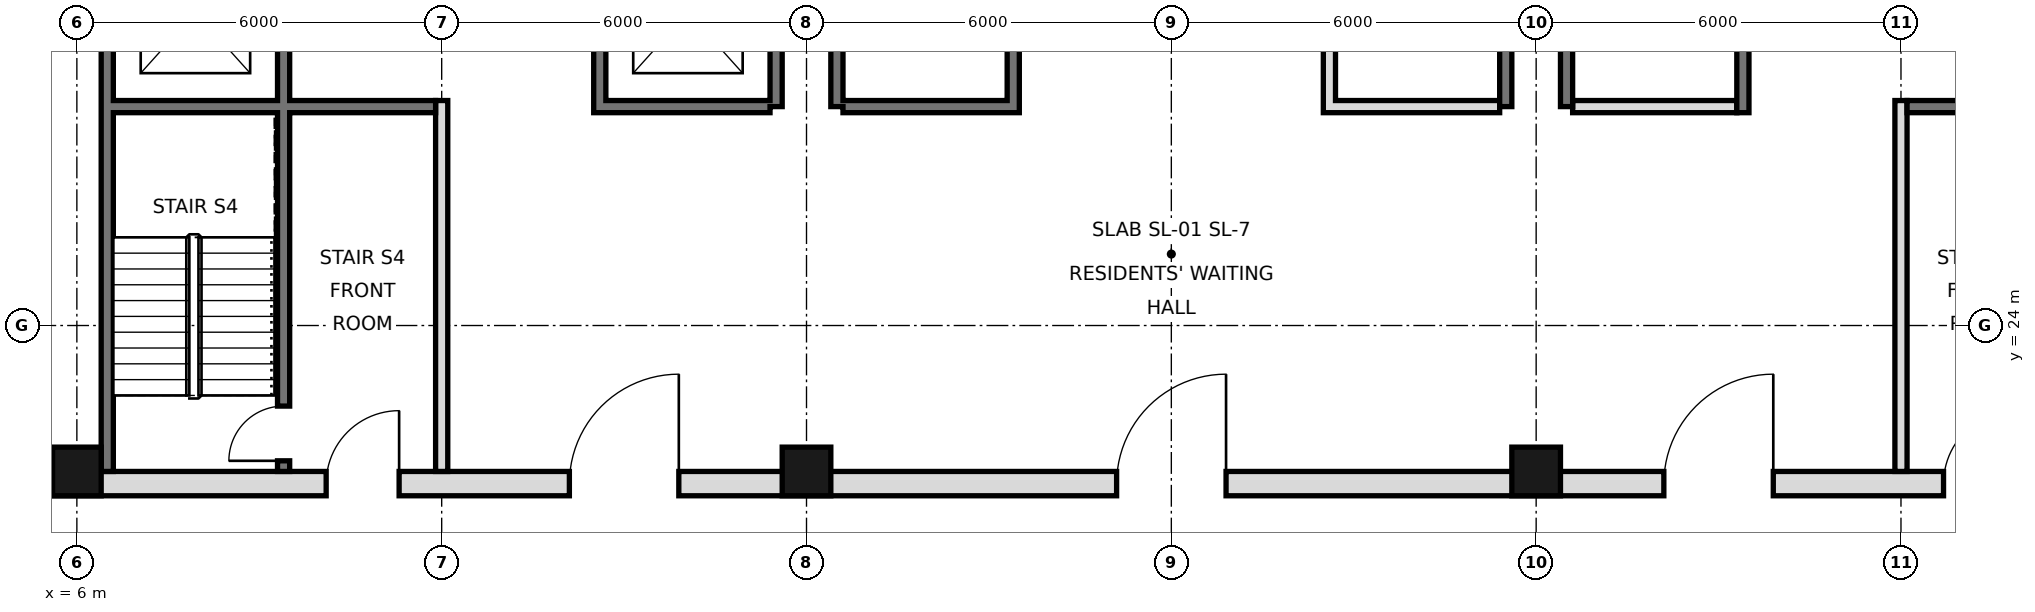
"""IFC4 building model, lengths in metres.
Left out: names, types, materials, properties, quantities, classifications, styles, units other than length and angle.
Written with IfcOpenShell. Run it as: python <this file> out.ifc"""

import sys

from ifc_helpers import new_model, si_unit, direction, frame, frame_2d, origin, origin_2d, place, context, subcontext, project, spatial, rectangle, hollow_rectangle, extrude, element, fill, save


model = new_model("IFC4")
c1 = context("Model", 3, precision=1e-05, world=origin(), true_north=direction((0.0, 1.0)))
c2 = subcontext(c1, "Body", "Model", "MODEL_VIEW")
j1 = project(units=[si_unit("LENGTHUNIT", "METRE"), si_unit("PLANEANGLEUNIT", "RADIAN")], contexts=[c1])
p1 = place(None, origin())
s1 = spatial("IfcSite", under=j1, at=p1, CompositionType="ELEMENT")
p2 = place(p1, origin())
s2 = spatial("IfcBuilding", under=s1, at=p2, CompositionType="ELEMENT")
p3 = place(p2, frame((0.0, 0.0, 147.4)))
s3 = spatial("IfcBuildingStorey", under=s2, at=p3, CompositionType="ELEMENT", Elevation=147.4)
for number, where, z_axis, x_axis in (
    (1, (6.0, 21.6, 0.0), (0.0, 0.0, 1.0), (1.0, 0.0, 0.0)),
    (2, (18.0, 21.6, 0.0), (0.0, 0.0, 1.0), (1.0, 0.0, 0.0)),
    (3, (30.0, 21.6, 0.0), (0.0, 0.0, 1.0), (1.0, 0.0, 0.0)),
):
    element("IfcColumn", number, at=place(p3, frame(where, z_axis=z_axis, x_axis=x_axis)), inside=s3, PredefinedType="COLUMN", context=c2, shape_type="SweptSolid", body=[
        extrude(hollow_rectangle(XDim=0.8, YDim=0.8, WallThickness=0.045, at=origin_2d()), origin(), (0.0, 0.0, 1.0), 3.6),
    ])
p4 = place(p3, frame((6.5, 21.6, 0.0), z_axis=(0.0, 0.0, 1.0), x_axis=(0.0, 1.0, 0.0)))
e4 = element("IfcWall", 4, at=p4, inside=s3, PredefinedType="SOLIDWALL", context=c2, shape_type="SweptSolid", body=[
    extrude(rectangle(XDim=23.5, YDim=0.2, at=frame_2d((11.75, 0.0))), origin(), (0.0, 0.0, 1.0), 3.42),
])
for number, where, z_axis, x_axis in (
    (5, (17.5, 27.6, 0.0), (0.0, 0.0, 1.0), (0.0, 1.0, 0.0)),
    (6, (18.5, 27.6, 0.0), (0.0, 0.0, 1.0), (0.0, 1.0, 0.0)),
    (7, (29.5, 27.6, 0.0), (0.0, 0.0, 1.0), (0.0, 1.0, 0.0)),
    (8, (30.5, 27.6, 0.0), (0.0, 0.0, 1.0), (0.0, 1.0, 0.0)),
):
    element("IfcWall", number, at=place(p3, frame(where, z_axis=z_axis, x_axis=x_axis)), inside=s3, PredefinedType="SOLIDWALL", context=c2, shape_type="SweptSolid", body=[
        extrude(rectangle(XDim=17.5, YDim=0.2, at=frame_2d((8.75, 0.0))), origin(), (0.0, 0.0, 1.0), 3.42),
    ])
p5 = place(p3, frame((5.6, 21.4, 0.0), z_axis=(0.0, 0.0, 1.0), x_axis=(1.0, 0.0, 0.0)))
e9 = element("IfcWall", 9, at=p5, inside=s3, PredefinedType="SOLIDWALL", context=c2, shape_type="SweptSolid", body=[
    extrude(rectangle(XDim=36.8, YDim=0.4, at=frame_2d((18.4, 0.0))), origin(), (0.0, 0.0, 1.0), 3.42),
])
p6 = place(p5, frame((8.5, 0.0, 0.0)))
e10 = element("IfcOpeningElement", 10, at=p6, cuts=e9, PredefinedType="OPENING", context=c2, shape_type="SweptSolid", body=[
    extrude(rectangle(XDim=1.8, YDim=2.1, at=frame_2d((0.9, 1.05))), frame((0.0, 0.21, 0.0), z_axis=(0.0, -1.0, 0.0), x_axis=(1.0, 0.0, 0.0)), (0.0, 0.0, 1.0), 0.42),
])
p7 = place(p5, frame((17.5, 0.0, 0.0)))
e11 = element("IfcOpeningElement", 11, at=p7, cuts=e9, PredefinedType="OPENING", context=c2, shape_type="SweptSolid", body=[
    extrude(rectangle(XDim=1.8, YDim=2.1, at=frame_2d((0.9, 1.05))), frame((0.0, 0.21, 0.0), z_axis=(0.0, -1.0, 0.0), x_axis=(1.0, 0.0, 0.0)), (0.0, 0.0, 1.0), 0.42),
])
p8 = place(p5, frame((26.5, 0.0, 0.0)))
e12 = element("IfcOpeningElement", 12, at=p8, cuts=e9, PredefinedType="OPENING", context=c2, shape_type="SweptSolid", body=[
    extrude(rectangle(XDim=1.8, YDim=2.1, at=frame_2d((0.9, 1.05))), frame((0.0, 0.21, 0.0), z_axis=(0.0, -1.0, 0.0), x_axis=(1.0, 0.0, 0.0)), (0.0, 0.0, 1.0), 0.42),
])
p9 = place(p5, frame((4.5, 0.0, 0.0)))
e13 = element("IfcOpeningElement", 13, at=p9, cuts=e9, PredefinedType="OPENING", context=c2, shape_type="SweptSolid", body=[
    extrude(rectangle(XDim=1.2, YDim=2.1, at=frame_2d((0.6, 1.05))), frame((0.0, 0.21, 0.0), z_axis=(0.0, -1.0, 0.0), x_axis=(1.0, 0.0, 0.0)), (0.0, 0.0, 1.0), 0.42),
])
p10 = place(p5, frame((31.1, 0.0, 0.0)))
e14 = element("IfcOpeningElement", 14, at=p10, cuts=e9, PredefinedType="OPENING", context=c2, shape_type="SweptSolid", body=[
    extrude(rectangle(XDim=1.2, YDim=2.1, at=frame_2d((0.6, 1.05))), frame((0.0, 0.21, 0.0), z_axis=(0.0, -1.0, 0.0), x_axis=(1.0, 0.0, 0.0)), (0.0, 0.0, 1.0), 0.42),
])
p11 = place(p3, frame((12.0, 21.6, 0.0), z_axis=(0.0, 0.0, 1.0), x_axis=(0.0, 1.0, 0.0)))
e15 = element("IfcWall", 15, at=p11, inside=s3, PredefinedType="PARTITIONING", context=c2, shape_type="SweptSolid", body=[
    extrude(rectangle(XDim=6.1, YDim=0.2, at=frame_2d((3.05, 0.0))), origin(), (0.0, 0.0, 1.0), 3.42),
])
p12 = place(p3, frame((14.6, 27.5, 0.0), z_axis=(0.0, 0.0, 1.0), x_axis=(0.0, 1.0, 0.0)))
e16 = element("IfcWall", 16, at=p12, inside=s3, PredefinedType="SOLIDWALL", context=c2, shape_type="SweptSolid", body=[
    extrude(rectangle(XDim=17.5, YDim=0.2, at=frame_2d((8.75, 0.0))), origin(), (0.0, 0.0, 1.0), 3.42),
])
p13 = place(p12, frame((1.1, 0.0, 0.0)))
e17 = element("IfcOpeningElement", 17, at=p13, cuts=e16, PredefinedType="OPENING", context=c2, shape_type="SweptSolid", body=[
    extrude(rectangle(XDim=1.1, YDim=2.1, at=frame_2d((0.55, 1.05))), frame((0.0, 0.11, 0.0), z_axis=(0.0, -1.0, 0.0), x_axis=(1.0, 0.0, 0.0)), (0.0, 0.0, 1.0), 0.22),
])
p14 = place(p12, frame((4.2, 0.0, 0.0)))
e18 = element("IfcOpeningElement", 18, at=p14, cuts=e16, PredefinedType="OPENING", context=c2, shape_type="SweptSolid", body=[
    extrude(rectangle(XDim=1.1, YDim=2.1, at=frame_2d((0.55, 1.05))), frame((0.0, 0.11, 0.0), z_axis=(0.0, -1.0, 0.0), x_axis=(1.0, 0.0, 0.0)), (0.0, 0.0, 1.0), 0.22),
])
p15 = place(p12, frame((15.4, 0.0, 0.0)))
e19 = element("IfcOpeningElement", 19, at=p15, cuts=e16, PredefinedType="OPENING", context=c2, shape_type="SweptSolid", body=[
    extrude(rectangle(XDim=1.1, YDim=2.1, at=frame_2d((0.55, 1.05))), frame((0.0, 0.11, 0.0), z_axis=(0.0, -1.0, 0.0), x_axis=(1.0, 0.0, 0.0)), (0.0, 0.0, 1.0), 0.22),
])
p16 = place(p12, frame((9.9, 0.0, 0.0)))
e20 = element("IfcOpeningElement", 20, at=p16, cuts=e16, PredefinedType="OPENING", context=c2, shape_type="SweptSolid", body=[
    extrude(rectangle(XDim=0.9, YDim=2.1, at=frame_2d((0.45, 1.05))), frame((0.0, 0.11, 0.0), z_axis=(0.0, -1.0, 0.0), x_axis=(1.0, 0.0, 0.0)), (0.0, 0.0, 1.0), 0.22),
])
p17 = place(p3, frame((21.4, 27.5, 0.0), z_axis=(0.0, 0.0, 1.0), x_axis=(0.0, 1.0, 0.0)))
e21 = element("IfcWall", 21, at=p17, inside=s3, PredefinedType="SOLIDWALL", context=c2, shape_type="SweptSolid", body=[
    extrude(rectangle(XDim=17.5, YDim=0.2, at=frame_2d((8.75, 0.0))), origin(), (0.0, 0.0, 1.0), 3.42),
])
p18 = place(p17, frame((9.8, 0.0, 0.0)))
e22 = element("IfcOpeningElement", 22, at=p18, cuts=e21, PredefinedType="OPENING", context=c2, shape_type="SweptSolid", body=[
    extrude(rectangle(XDim=1.0, YDim=2.1, at=frame_2d((0.5, 1.05))), frame((0.0, 0.11, 0.0), z_axis=(0.0, -1.0, 0.0), x_axis=(1.0, 0.0, 0.0)), (0.0, 0.0, 1.0), 0.22),
])
p19 = place(p17, frame((7.4, 0.0, 0.0)))
e23 = element("IfcOpeningElement", 23, at=p19, cuts=e21, PredefinedType="OPENING", context=c2, shape_type="SweptSolid", body=[
    extrude(rectangle(XDim=0.9, YDim=2.1, at=frame_2d((0.45, 1.05))), frame((0.0, 0.11, 0.0), z_axis=(0.0, -1.0, 0.0), x_axis=(1.0, 0.0, 0.0)), (0.0, 0.0, 1.0), 0.22),
])
p20 = place(p3, frame((26.6, 27.5, 0.0), z_axis=(0.0, 0.0, 1.0), x_axis=(0.0, 1.0, 0.0)))
e24 = element("IfcWall", 24, at=p20, inside=s3, PredefinedType="SOLIDWALL", context=c2, shape_type="SweptSolid", body=[
    extrude(rectangle(XDim=17.5, YDim=0.2, at=frame_2d((8.75, 0.0))), origin(), (0.0, 0.0, 1.0), 3.42),
])
p21 = place(p20, frame((4.3, 0.0, 0.0)))
e25 = element("IfcOpeningElement", 25, at=p21, cuts=e24, PredefinedType="OPENING", context=c2, shape_type="SweptSolid", body=[
    extrude(rectangle(XDim=0.9, YDim=2.1, at=frame_2d((0.45, 1.05))), frame((0.0, 0.11, 0.0), z_axis=(0.0, -1.0, 0.0), x_axis=(1.0, 0.0, 0.0)), (0.0, 0.0, 1.0), 0.22),
])
p22 = place(p20, frame((10.35, 0.0, 0.0)))
e26 = element("IfcOpeningElement", 26, at=p22, cuts=e24, PredefinedType="OPENING", context=c2, shape_type="SweptSolid", body=[
    extrude(rectangle(XDim=1.0, YDim=2.1, at=frame_2d((0.5, 1.05))), frame((0.0, 0.11, 0.0), z_axis=(0.0, -1.0, 0.0), x_axis=(1.0, 0.0, 0.0)), (0.0, 0.0, 1.0), 0.22),
])
p23 = place(p20, frame((14.575, 0.0, 0.0)))
e27 = element("IfcOpeningElement", 27, at=p23, cuts=e24, PredefinedType="OPENING", context=c2, shape_type="SweptSolid", body=[
    extrude(rectangle(XDim=1.0, YDim=2.1, at=frame_2d((0.5, 1.05))), frame((0.0, 0.11, 0.0), z_axis=(0.0, -1.0, 0.0), x_axis=(1.0, 0.0, 0.0)), (0.0, 0.0, 1.0), 0.22),
])
p24 = place(p3, frame((33.4, 27.5, 0.0), z_axis=(0.0, 0.0, 1.0), x_axis=(0.0, 1.0, 0.0)))
e28 = element("IfcWall", 28, at=p24, inside=s3, PredefinedType="SOLIDWALL", context=c2, shape_type="SweptSolid", body=[
    extrude(rectangle(XDim=17.5, YDim=0.2, at=frame_2d((8.75, 0.0))), origin(), (0.0, 0.0, 1.0), 3.42),
])
p25 = place(p24, frame((15.4, 0.0, 0.0)))
e29 = element("IfcOpeningElement", 29, at=p25, cuts=e28, PredefinedType="OPENING", context=c2, shape_type="SweptSolid", body=[
    extrude(rectangle(XDim=1.1, YDim=2.1, at=frame_2d((0.55, 1.05))), frame((0.0, 0.11, 0.0), z_axis=(0.0, -1.0, 0.0), x_axis=(1.0, 0.0, 0.0)), (0.0, 0.0, 1.0), 0.22),
])
p26 = place(p24, frame((2.7, 0.0, 0.0)))
e30 = element("IfcOpeningElement", 30, at=p26, cuts=e28, PredefinedType="OPENING", context=c2, shape_type="SweptSolid", body=[
    extrude(rectangle(XDim=1.0, YDim=2.1, at=frame_2d((0.5, 1.05))), frame((0.0, 0.11, 0.0), z_axis=(0.0, -1.0, 0.0), x_axis=(1.0, 0.0, 0.0)), (0.0, 0.0, 1.0), 0.22),
])
p27 = place(p24, frame((9.9, 0.0, 0.0)))
e31 = element("IfcOpeningElement", 31, at=p27, cuts=e28, PredefinedType="OPENING", context=c2, shape_type="SweptSolid", body=[
    extrude(rectangle(XDim=0.9, YDim=2.1, at=frame_2d((0.45, 1.05))), frame((0.0, 0.11, 0.0), z_axis=(0.0, -1.0, 0.0), x_axis=(1.0, 0.0, 0.0)), (0.0, 0.0, 1.0), 0.22),
])
p28 = place(p3, frame((36.0, 21.6, 0.0), z_axis=(0.0, 0.0, 1.0), x_axis=(0.0, 1.0, 0.0)))
e32 = element("IfcWall", 32, at=p28, inside=s3, PredefinedType="PARTITIONING", context=c2, shape_type="SweptSolid", body=[
    extrude(rectangle(XDim=6.1, YDim=0.2, at=frame_2d((3.05, 0.0))), origin(), (0.0, 0.0, 1.0), 3.42),
])
p29 = place(p3, frame((9.4, 21.6, 0.0), z_axis=(0.0, 0.0, 1.0), x_axis=(0.0, 1.0, 0.0)))
e33 = element("IfcWall", 33, at=p29, inside=s3, PredefinedType="SOLIDWALL", context=c2, shape_type="SweptSolid", body=[
    extrude(rectangle(XDim=23.4, YDim=0.2, at=frame_2d((11.7, 0.0))), origin(), (0.0, 0.0, 1.0), 3.42),
])
p30 = place(p29, frame((7.0, 0.0, 0.0)))
e34 = element("IfcOpeningElement", 34, at=p30, cuts=e33, PredefinedType="OPENING", context=c2, shape_type="SweptSolid", body=[
    extrude(rectangle(XDim=1.1, YDim=2.1, at=frame_2d((0.55, 1.05))), frame((0.0, 0.11, 0.0), z_axis=(0.0, -1.0, 0.0), x_axis=(1.0, 0.0, 0.0)), (0.0, 0.0, 1.0), 0.22),
])
p31 = place(p29, frame((10.1, 0.0, 0.0)))
e35 = element("IfcOpeningElement", 35, at=p31, cuts=e33, PredefinedType="OPENING", context=c2, shape_type="SweptSolid", body=[
    extrude(rectangle(XDim=1.1, YDim=2.1, at=frame_2d((0.55, 1.05))), frame((0.0, 0.11, 0.0), z_axis=(0.0, -1.0, 0.0), x_axis=(1.0, 0.0, 0.0)), (0.0, 0.0, 1.0), 0.22),
])
p32 = place(p29, frame((13.2, 0.0, 0.0)))
e36 = element("IfcOpeningElement", 36, at=p32, cuts=e33, PredefinedType="OPENING", context=c2, shape_type="SweptSolid", body=[
    extrude(rectangle(XDim=1.1, YDim=2.1, at=frame_2d((0.55, 1.05))), frame((0.0, 0.11, 0.0), z_axis=(0.0, -1.0, 0.0), x_axis=(1.0, 0.0, 0.0)), (0.0, 0.0, 1.0), 0.22),
])
p33 = place(p29, frame((15.7, 0.0, 0.0)))
e37 = element("IfcOpeningElement", 37, at=p33, cuts=e33, PredefinedType="OPENING", context=c2, shape_type="SweptSolid", body=[
    extrude(rectangle(XDim=1.0, YDim=2.1, at=frame_2d((0.5, 1.05))), frame((0.0, 0.11, 0.0), z_axis=(0.0, -1.0, 0.0), x_axis=(1.0, 0.0, 0.0)), (0.0, 0.0, 1.0), 0.22),
])
p34 = place(p29, frame((0.175, 0.0, 0.0)))
e38 = element("IfcOpeningElement", 38, at=p34, cuts=e33, PredefinedType="OPENING", context=c2, shape_type="SweptSolid", body=[
    extrude(rectangle(XDim=0.9, YDim=2.1, at=frame_2d((0.45, 1.05))), frame((0.0, 0.11, 0.0), z_axis=(0.0, -1.0, 0.0), x_axis=(1.0, 0.0, 0.0)), (0.0, 0.0, 1.0), 0.22),
])
for number, where, z_axis, x_axis in (
    (39, (14.7, 27.6, 0.0), (0.0, 0.0, 1.0), (1.0, 0.0, 0.0)),
    (40, (18.6, 27.6, 0.0), (0.0, 0.0, 1.0), (1.0, 0.0, 0.0)),
    (41, (26.7, 27.6, 0.0), (0.0, 0.0, 1.0), (1.0, 0.0, 0.0)),
):
    element("IfcWall", number, at=place(p3, frame(where, z_axis=z_axis, x_axis=x_axis)), inside=s3, PredefinedType="SOLIDWALL", context=c2, shape_type="SweptSolid", body=[
        extrude(rectangle(XDim=2.7, YDim=0.2, at=frame_2d((1.35, 0.0))), origin(), (0.0, 0.0, 1.0), 3.42),
    ])
p35 = place(p3, frame((30.6, 27.6, 0.0), z_axis=(0.0, 0.0, 1.0), x_axis=(1.0, 0.0, 0.0)))
e42 = element("IfcWall", 42, at=p35, inside=s3, PredefinedType="PARTITIONING", context=c2, shape_type="SweptSolid", body=[
    extrude(rectangle(XDim=2.7, YDim=0.2, at=frame_2d((1.35, 0.0))), origin(), (0.0, 0.0, 1.0), 3.42),
])
for number, where, z_axis, x_axis in (
    (43, (36.1, 27.6, 0.0), (0.0, 0.0, 1.0), (1.0, 0.0, 0.0)),
    (44, (6.6, 27.6, 0.0), (0.0, 0.0, 1.0), (1.0, 0.0, 0.0)),
):
    element("IfcWall", number, at=place(p3, frame(where, z_axis=z_axis, x_axis=x_axis)), inside=s3, PredefinedType="SOLIDWALL", context=c2, shape_type="SweptSolid", body=[
        extrude(rectangle(XDim=5.3, YDim=0.2, at=frame_2d((2.65, 0.0))), origin(), (0.0, 0.0, 1.0), 3.42),
    ])
p36 = place(p6, frame((1.8, 0.0, 0.0), z_axis=(0.0, 0.0, 1.0), x_axis=(-1.0, 0.0, 0.0)))
e45 = element("IfcDoor", 45, at=p36, inside=s3, OperationType="SINGLE_SWING_LEFT", PredefinedType="DOOR", context=c2, shape_type="SweptSolid", body=[
    extrude(rectangle(XDim=1.8, YDim=2.1, at=frame_2d((0.9, 1.05))), frame((0.0, 0.025, 0.0), z_axis=(0.0, -1.0, 0.0), x_axis=(1.0, 0.0, 0.0)), (0.0, 0.0, 1.0), 0.05),
])
fill(e10, e45)
p37 = place(p7, frame((1.8, 0.0, 0.0), z_axis=(0.0, 0.0, 1.0), x_axis=(-1.0, 0.0, 0.0)))
e46 = element("IfcDoor", 46, at=p37, inside=s3, OperationType="SINGLE_SWING_LEFT", PredefinedType="DOOR", context=c2, shape_type="SweptSolid", body=[
    extrude(rectangle(XDim=1.8, YDim=2.1, at=frame_2d((0.9, 1.05))), frame((0.0, 0.025, 0.0), z_axis=(0.0, -1.0, 0.0), x_axis=(1.0, 0.0, 0.0)), (0.0, 0.0, 1.0), 0.05),
])
fill(e11, e46)
p38 = place(p8, frame((1.8, 0.0, 0.0), z_axis=(0.0, 0.0, 1.0), x_axis=(-1.0, 0.0, 0.0)))
e47 = element("IfcDoor", 47, at=p38, inside=s3, OperationType="SINGLE_SWING_LEFT", PredefinedType="DOOR", context=c2, shape_type="SweptSolid", body=[
    extrude(rectangle(XDim=1.8, YDim=2.1, at=frame_2d((0.9, 1.05))), frame((0.0, 0.025, 0.0), z_axis=(0.0, -1.0, 0.0), x_axis=(1.0, 0.0, 0.0)), (0.0, 0.0, 1.0), 0.05),
])
fill(e12, e47)
p39 = place(p9, frame((1.2, 0.0, 0.0), z_axis=(0.0, 0.0, 1.0), x_axis=(-1.0, 0.0, 0.0)))
e48 = element("IfcDoor", 48, at=p39, inside=s3, OperationType="SINGLE_SWING_LEFT", PredefinedType="DOOR", context=c2, shape_type="SweptSolid", body=[
    extrude(rectangle(XDim=1.2, YDim=2.1, at=frame_2d((0.6, 1.05))), frame((0.0, 0.025, 0.0), z_axis=(0.0, -1.0, 0.0), x_axis=(1.0, 0.0, 0.0)), (0.0, 0.0, 1.0), 0.05),
])
fill(e13, e48)
p40 = place(p10, frame((1.2, 0.0, 0.0), z_axis=(0.0, 0.0, 1.0), x_axis=(-1.0, 0.0, 0.0)))
e49 = element("IfcDoor", 49, at=p40, inside=s3, OperationType="SINGLE_SWING_LEFT", PredefinedType="DOOR", context=c2, shape_type="SweptSolid", body=[
    extrude(rectangle(XDim=1.2, YDim=2.1, at=frame_2d((0.6, 1.05))), frame((0.0, 0.025, 0.0), z_axis=(0.0, -1.0, 0.0), x_axis=(1.0, 0.0, 0.0)), (0.0, 0.0, 1.0), 0.05),
])
fill(e14, e49)
p41 = place(p34, origin())
e50 = element("IfcDoor", 50, at=p41, inside=s3, OperationType="SINGLE_SWING_LEFT", PredefinedType="DOOR", context=c2, shape_type="SweptSolid", body=[
    extrude(rectangle(XDim=0.9, YDim=2.1, at=frame_2d((0.45, 1.05))), frame((0.0, 0.025, 0.0), z_axis=(0.0, -1.0, 0.0), x_axis=(1.0, 0.0, 0.0)), (0.0, 0.0, 1.0), 0.05),
])
fill(e38, e50)
save(model, sys.argv[1])
